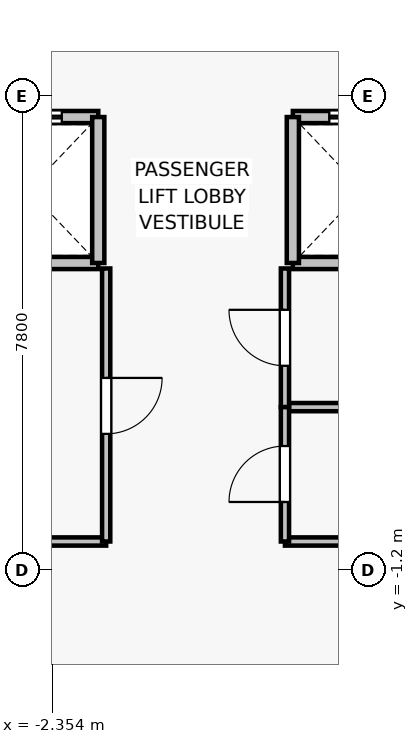
"""IFC4 building model, lengths in metres.
Left out: names, types, materials, properties, quantities, classifications, styles, units other than length and angle.
Written with IfcOpenShell. Run it as: python <this file> out.ifc"""

import sys

from ifc_helpers import new_model, si_unit, direction, frame, frame_2d, origin, place, context, subcontext, project, spatial, rectangle, extrude, source, transform, mapped, element, fill, save


model = new_model("IFC4")
c1 = context("Model", 3, precision=1e-05, world=origin(), true_north=direction((0.0, 1.0)))
c2 = subcontext(c1, "Body", "Model", "MODEL_VIEW")
j1 = project(units=[si_unit("LENGTHUNIT", "METRE"), si_unit("PLANEANGLEUNIT", "RADIAN")], contexts=[c1])
p1 = place(None, origin())
s1 = spatial("IfcSite", under=j1, at=p1, CompositionType="ELEMENT")
p2 = place(p1, origin())
s2 = spatial("IfcBuilding", under=s1, at=p2, CompositionType="ELEMENT")
p3 = place(p2, frame((0.0, 0.0, 169.3)))
s3 = spatial("IfcBuildingStorey", under=s2, at=p3, CompositionType="ELEMENT", Elevation=169.3)
p4 = place(p3, frame((-1.6, 3.85, 0.0), z_axis=(0.0, 0.0, 1.0), x_axis=(-1.0, 0.0, 0.0)))
e1 = element("IfcWall", 1, at=p4, inside=s3, PredefinedType="SOLIDWALL", context=c2, shape_type="SweptSolid", body=[
    extrude(rectangle(XDim=2.3, YDim=0.2, at=frame_2d((1.15, 0.0))), origin(), (0.0, 0.0, 1.0), 3.075),
])
p5 = place(p3, frame((-3.9, 6.25, 0.0), z_axis=(0.0, 0.0, 1.0), x_axis=(1.0, 0.0, 0.0)))
e2 = element("IfcWall", 2, at=p5, inside=s3, PredefinedType="SOLIDWALL", context=c2, shape_type="SweptSolid", body=[
    extrude(rectangle(XDim=2.3, YDim=0.2, at=frame_2d((1.15, 0.0))), origin(), (0.0, 0.0, 1.0), 3.075),
])
p6 = place(p5, frame((0.6, 0.0, 0.0)))
e3 = element("IfcOpeningElement", 3, at=p6, cuts=e2, PredefinedType="OPENING", context=c2, shape_type="SweptSolid", body=[
    extrude(rectangle(XDim=1.1, YDim=2.2, at=frame_2d((0.55, 1.1))), frame((0.0, 0.11, 0.0), z_axis=(0.0, -1.0, 0.0), x_axis=(1.0, 0.0, 0.0)), (0.0, 0.0, 1.0), 0.22),
])
p7 = place(p3, frame((-1.6, 6.25, 0.0), z_axis=(0.0, 0.0, 1.0), x_axis=(0.0, -1.0, 0.0)))
e4 = element("IfcWall", 4, at=p7, inside=s3, PredefinedType="SOLIDWALL", context=c2, shape_type="SweptSolid", body=[
    extrude(rectangle(XDim=2.4, YDim=0.2, at=frame_2d((1.2, 0.0))), origin(), (0.0, 0.0, 1.0), 3.075),
])
p8 = place(p3, frame((3.9, 3.85, 0.0), z_axis=(0.0, 0.0, 1.0), x_axis=(-1.0, 0.0, 0.0)))
e5 = element("IfcWall", 5, at=p8, inside=s3, PredefinedType="SOLIDWALL", context=c2, shape_type="SweptSolid", body=[
    extrude(rectangle(XDim=2.3, YDim=0.2, at=frame_2d((1.15, 0.0))), origin(), (0.0, 0.0, 1.0), 3.075),
])
p9 = place(p3, frame((1.6, 6.25, 0.0), z_axis=(0.0, 0.0, 1.0), x_axis=(1.0, 0.0, 0.0)))
e6 = element("IfcWall", 6, at=p9, inside=s3, PredefinedType="SOLIDWALL", context=c2, shape_type="SweptSolid", body=[
    extrude(rectangle(XDim=2.3, YDim=0.2, at=frame_2d((1.15, 0.0))), origin(), (0.0, 0.0, 1.0), 3.075),
])
p10 = place(p9, frame((0.6, 0.0, 0.0)))
e7 = element("IfcOpeningElement", 7, at=p10, cuts=e6, PredefinedType="OPENING", context=c2, shape_type="SweptSolid", body=[
    extrude(rectangle(XDim=1.1, YDim=2.2, at=frame_2d((0.55, 1.1))), frame((0.0, 0.11, 0.0), z_axis=(0.0, -1.0, 0.0), x_axis=(1.0, 0.0, 0.0)), (0.0, 0.0, 1.0), 0.22),
])
p11 = place(p3, frame((1.6, 3.85, 0.0), z_axis=(0.0, 0.0, 1.0), x_axis=(0.0, 1.0, 0.0)))
e8 = element("IfcWall", 8, at=p11, inside=s3, PredefinedType="SOLIDWALL", context=c2, shape_type="SweptSolid", body=[
    extrude(rectangle(XDim=2.4, YDim=0.2, at=frame_2d((1.2, 0.0))), origin(), (0.0, 0.0, 1.0), 3.075),
])
p12 = place(p3, frame((-1.47, -0.73, 0.0), z_axis=(0.0, 0.0, 1.0), x_axis=(-1.0, 0.0, 0.0)))
e9 = element("IfcWall", 9, at=p12, inside=s3, PredefinedType="PARTITIONING", context=c2, shape_type="SweptSolid", body=[
    extrude(rectangle(XDim=5.11, YDim=0.135, at=frame_2d((2.555, 0.0))), origin(), (0.0, 0.0, 1.0), 3.075),
])
p13 = place(p3, frame((-1.47, 3.76, 0.0), z_axis=(0.0, 0.0, 1.0), x_axis=(0.0, -1.0, 0.0)))
e10 = element("IfcWall", 10, at=p13, inside=s3, PredefinedType="PARTITIONING", context=c2, shape_type="SweptSolid", body=[
    extrude(rectangle(XDim=4.49, YDim=0.135, at=frame_2d((2.245, 0.0))), origin(), (0.0, 0.0, 1.0), 3.075),
])
p14 = place(p13, frame((1.8, 0.0, 0.0)))
e11 = element("IfcOpeningElement", 11, at=p14, cuts=e10, PredefinedType="OPENING", context=c2, shape_type="SweptSolid", body=[
    extrude(rectangle(XDim=0.92, YDim=2.1, at=frame_2d((0.46, 1.05))), frame((0.0, 0.077, 0.0), z_axis=(0.0, -1.0, 0.0), x_axis=(1.0, 0.0, 0.0)), (0.0, 0.0, 1.0), 0.155),
])
p15 = place(p3, frame((6.58, 1.48, 0.0), z_axis=(0.0, 0.0, 1.0), x_axis=(-1.0, 0.0, 0.0)))
e12 = element("IfcWall", 12, at=p15, inside=s3, PredefinedType="PARTITIONING", context=c2, shape_type="SweptSolid", body=[
    extrude(rectangle(XDim=5.11, YDim=0.135, at=frame_2d((2.555, 0.0))), origin(), (0.0, 0.0, 1.0), 3.075),
])
p16 = place(p3, frame((1.47, 1.48, 0.0), z_axis=(0.0, 0.0, 1.0), x_axis=(0.0, 1.0, 0.0)))
e13 = element("IfcWall", 13, at=p16, inside=s3, PredefinedType="PARTITIONING", context=c2, shape_type="SweptSolid", body=[
    extrude(rectangle(XDim=2.28, YDim=0.135, at=frame_2d((1.14, 0.0))), origin(), (0.0, 0.0, 1.0), 3.075),
])
p17 = place(p16, frame((0.68, 0.0, 0.0)))
e14 = element("IfcOpeningElement", 14, at=p17, cuts=e13, PredefinedType="OPENING", context=c2, shape_type="SweptSolid", body=[
    extrude(rectangle(XDim=0.92, YDim=2.1, at=frame_2d((0.46, 1.05))), frame((0.0, 0.077, 0.0), z_axis=(0.0, -1.0, 0.0), x_axis=(1.0, 0.0, 0.0)), (0.0, 0.0, 1.0), 0.155),
])
p18 = place(p3, frame((4.18, -0.73, 0.0), z_axis=(0.0, 0.0, 1.0), x_axis=(-1.0, 0.0, 0.0)))
e15 = element("IfcWall", 15, at=p18, inside=s3, PredefinedType="PARTITIONING", context=c2, shape_type="SweptSolid", body=[
    extrude(rectangle(XDim=2.71, YDim=0.135, at=frame_2d((1.355, 0.0))), origin(), (0.0, 0.0, 1.0), 3.075),
])
p19 = place(p3, frame((1.47, -0.73, 0.0), z_axis=(0.0, 0.0, 1.0), x_axis=(0.0, 1.0, 0.0)))
e16 = element("IfcWall", 16, at=p19, inside=s3, PredefinedType="PARTITIONING", context=c2, shape_type="SweptSolid", body=[
    extrude(rectangle(XDim=2.21, YDim=0.135, at=frame_2d((1.105, 0.0))), origin(), (0.0, 0.0, 1.0), 3.075),
])
p20 = place(p19, frame((0.65, 0.0, 0.0)))
e17 = element("IfcOpeningElement", 17, at=p20, cuts=e16, PredefinedType="OPENING", context=c2, shape_type="SweptSolid", body=[
    extrude(rectangle(XDim=0.92, YDim=2.1, at=frame_2d((0.46, 1.05))), frame((0.0, 0.077, 0.0), z_axis=(0.0, -1.0, 0.0), x_axis=(1.0, 0.0, 0.0)), (0.0, 0.0, 1.0), 0.155),
])
m1 = source(origin(), c2, "Body", "SweptSolid", [
    extrude(rectangle(XDim=1.1, YDim=2.2, at=frame_2d((0.55, 1.1))), frame((0.0, 0.025, 0.0), z_axis=(0.0, -1.0, 0.0), x_axis=(1.0, 0.0, 0.0)), (0.0, 0.0, 1.0), 0.05),
])
p21 = place(p6, origin())
e18 = element("IfcDoor", 18, at=p21, inside=s3, OperationType="DOUBLE_DOOR_SLIDING", PredefinedType="DOOR", context=c2, shape_type="MappedRepresentation", body=[
    mapped(m1, transform((0.0, 0.0, 0.0), x_axis=(1.0, 0.0, 0.0), y_axis=(0.0, 1.0, 0.0), z_axis=(0.0, 0.0, 1.0), scale=1.0)),
])
fill(e3, e18)
p22 = place(p10, origin())
e19 = element("IfcDoor", 19, at=p22, inside=s3, OperationType="DOUBLE_DOOR_SLIDING", PredefinedType="DOOR", context=c2, shape_type="MappedRepresentation", body=[
    mapped(m1, transform((0.0, 0.0, 0.0), x_axis=(1.0, 0.0, 0.0), y_axis=(0.0, 1.0, 0.0), z_axis=(0.0, 0.0, 1.0), scale=1.0)),
])
fill(e7, e19)
m2 = source(origin(), c2, "Body", "SweptSolid", [
    extrude(rectangle(XDim=0.92, YDim=2.1, at=frame_2d((0.46, 1.05))), frame((0.0, 0.025, 0.0), z_axis=(0.0, -1.0, 0.0), x_axis=(1.0, 0.0, 0.0)), (0.0, 0.0, 1.0), 0.05),
])
p23 = place(p14, origin())
e20 = element("IfcDoor", 20, at=p23, inside=s3, OperationType="SINGLE_SWING_LEFT", PredefinedType="DOOR", context=c2, shape_type="MappedRepresentation", body=[
    mapped(m2, transform((0.0, 0.0, 0.0), x_axis=(1.0, 0.0, 0.0), y_axis=(0.0, 1.0, 0.0), z_axis=(0.0, 0.0, 1.0), scale=1.0)),
])
fill(e11, e20)
p24 = place(p17, origin())
e21 = element("IfcDoor", 21, at=p24, inside=s3, OperationType="SINGLE_SWING_RIGHT", PredefinedType="DOOR", context=c2, shape_type="MappedRepresentation", body=[
    mapped(m2, transform((0.0, 0.0, 0.0), x_axis=(1.0, 0.0, 0.0), y_axis=(0.0, 1.0, 0.0), z_axis=(0.0, 0.0, 1.0), scale=1.0)),
])
fill(e14, e21)
p25 = place(p20, origin())
e22 = element("IfcDoor", 22, at=p25, inside=s3, OperationType="SINGLE_SWING_LEFT", PredefinedType="DOOR", context=c2, shape_type="MappedRepresentation", body=[
    mapped(m2, transform((0.0, 0.0, 0.0), x_axis=(1.0, 0.0, 0.0), y_axis=(0.0, 1.0, 0.0), z_axis=(0.0, 0.0, 1.0), scale=1.0)),
])
fill(e17, e22)
save(model, sys.argv[1])
